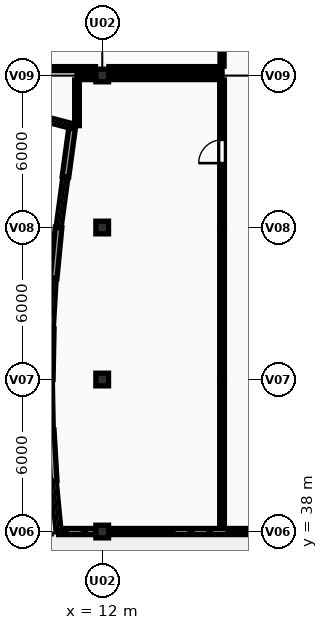
"""IFC4 building model, lengths in metres.
Left out: names, types, materials, properties, quantities, classifications, styles, units other than length and angle.
Written with IfcOpenShell. Run it as: python <this file> out.ifc"""

import sys

from ifc_helpers import new_model, si_unit, direction, frame, frame_2d, origin, origin_2d, place, context, subcontext, project, spatial, rectangle, extrude, element, fill, save


model = new_model("IFC4")
c1 = context("Model", 3, precision=1e-05, world=origin(), true_north=direction((0.0, 1.0)))
c2 = subcontext(c1, "Body", "Model", "MODEL_VIEW")
j1 = project(units=[si_unit("LENGTHUNIT", "METRE"), si_unit("PLANEANGLEUNIT", "RADIAN")], contexts=[c1])
p1 = place(None, origin())
s1 = spatial("IfcSite", under=j1, at=p1, CompositionType="ELEMENT")
p2 = place(p1, origin())
s2 = spatial("IfcBuilding", under=s1, at=p2, CompositionType="ELEMENT")
p3 = place(p2, frame((0.0, 0.0, 4.5)))
s3 = spatial("IfcBuildingStorey", under=s2, at=p3, CompositionType="ELEMENT", Elevation=4.5)
for number, where, z_axis, x_axis in (
    (1, (12.0, 38.0, 0.0), (0.0, 0.0, 1.0), (1.0, 0.0, 0.0)),
    (2, (12.0, 44.0, 0.0), (0.0, 0.0, 1.0), (1.0, 0.0, 0.0)),
    (3, (12.0, 50.0, 0.0), (0.0, 0.0, 1.0), (1.0, 0.0, 0.0)),
    (4, (12.0, 56.0, 0.0), (0.0, 0.0, 1.0), (1.0, 0.0, 0.0)),
):
    element("IfcColumn", number, at=place(p3, frame(where, z_axis=z_axis, x_axis=x_axis)), inside=s3, PredefinedType="COLUMN", context=c2, shape_type="SweptSolid", body=[
        extrude(rectangle(XDim=0.5, YDim=0.5, at=origin_2d()), origin(), (0.0, 0.0, 1.0), 3.9),
    ])
p4 = place(p3, frame((10.278, 38.0, 0.0), z_axis=(0.0, 0.0, 1.0), x_axis=(-0.09623099978, 0.99535902803, 0.0)))
e5 = element("IfcWall", 5, at=p4, inside=s3, PredefinedType="SOLIDWALL", context=c2, shape_type="SweptSolid", body=[
    extrude(rectangle(XDim=2.009, YDim=0.2, at=frame_2d((1.005, 0.0))), origin(), (0.0, 0.0, 1.0), 0.95),
])
p5 = place(p3, frame((10.085, 40.0, 0.0), z_axis=(0.0, 0.0, 1.0), x_axis=(-0.057643251596, 0.998337245396, 0.0)))
e6 = element("IfcWall", 6, at=p5, inside=s3, PredefinedType="SOLIDWALL", context=c2, shape_type="SweptSolid", body=[
    extrude(rectangle(XDim=2.003, YDim=0.26, at=frame_2d((1.002, 0.0))), origin(), (0.0, 0.0, 1.0), 3.65),
])
p6 = place(p3, frame((9.969, 42.0, 0.0), z_axis=(0.0, 0.0, 1.0), x_axis=(-0.019283523045, 0.999814055582, 0.0)))
e7 = element("IfcWall", 7, at=p6, inside=s3, PredefinedType="SOLIDWALL", context=c2, shape_type="SweptSolid", body=[
    extrude(rectangle(XDim=2.0, YDim=0.2, at=frame_2d((1.0, 0.0))), origin(), (0.0, 0.0, 1.0), 0.95),
])
p7 = place(p3, frame((9.931, 44.0, 0.0), z_axis=(0.0, 0.0, 1.0), x_axis=(0.019283523045, 0.999814055582, 0.0)))
e8 = element("IfcWall", 8, at=p7, inside=s3, PredefinedType="SOLIDWALL", context=c2, shape_type="SweptSolid", body=[
    extrude(rectangle(XDim=2.0, YDim=0.26, at=frame_2d((1.0, 0.0))), origin(), (0.0, 0.0, 1.0), 3.65),
])
p8 = place(p3, frame((9.969, 46.0, 0.0), z_axis=(0.0, 0.0, 1.0), x_axis=(0.057643251596, 0.998337245396, 0.0)))
e9 = element("IfcWall", 9, at=p8, inside=s3, PredefinedType="SOLIDWALL", context=c2, shape_type="SweptSolid", body=[
    extrude(rectangle(XDim=2.003, YDim=0.2, at=frame_2d((1.002, 0.0))), origin(), (0.0, 0.0, 1.0), 0.95),
])
p9 = place(p3, frame((10.085, 48.0, 0.0), z_axis=(0.0, 0.0, 1.0), x_axis=(0.09623099978, 0.99535902803, 0.0)))
e10 = element("IfcWall", 10, at=p9, inside=s3, PredefinedType="SOLIDWALL", context=c2, shape_type="SweptSolid", body=[
    extrude(rectangle(XDim=2.009, YDim=0.26, at=frame_2d((1.005, 0.0))), origin(), (0.0, 0.0, 1.0), 3.65),
])
p10 = place(p3, frame((10.278, 50.0, 0.0), z_axis=(0.0, 0.0, 1.0), x_axis=(0.134627389588, 0.990896294257, 0.0)))
e11 = element("IfcWall", 11, at=p10, inside=s3, PredefinedType="SOLIDWALL", context=c2, shape_type="SweptSolid", body=[
    extrude(rectangle(XDim=2.018, YDim=0.2, at=frame_2d((1.009, 0.0))), origin(), (0.0, 0.0, 1.0), 0.95),
])
p11 = place(p3, frame((10.55, 52.0, 0.0), z_axis=(0.0, 0.0, 1.0), x_axis=(0.134627389588, 0.990896294257, 0.0)))
e12 = element("IfcWall", 12, at=p11, inside=s3, PredefinedType="SOLIDWALL", context=c2, shape_type="SweptSolid", body=[
    extrude(rectangle(XDim=2.018, YDim=0.26, at=frame_2d((1.009, 0.0))), origin(), (0.0, 0.0, 1.0), 3.65),
])
p12 = place(p3, frame((10.822, 54.0, 0.0), z_axis=(0.0, 0.0, 1.0), x_axis=(-0.967937555254, 0.251190941573, 0.0)))
e13 = element("IfcWall", 13, at=p12, inside=s3, PredefinedType="SOLIDWALL", context=c2, shape_type="SweptSolid", body=[
    extrude(rectangle(XDim=7.962, YDim=0.2, at=frame_2d((3.981, 0.0))), origin(), (0.0, 0.0, 1.0), 0.95),
])
p13 = place(p3, frame((19.75, 38.0, 0.0), z_axis=(0.0, 0.0, 1.0), x_axis=(-1.0, 0.0, 0.0)))
e14 = element("IfcWall", 14, at=p13, inside=s3, PredefinedType="SOLIDWALL", context=c2, shape_type="SweptSolid", body=[
    extrude(rectangle(XDim=7.5, YDim=0.24, at=frame_2d((3.75, 0.0))), origin(), (0.0, 0.0, 1.0), 2.998),
])
p14 = place(p3, frame((11.75, 38.0, 0.0), z_axis=(0.0, 0.0, 1.0), x_axis=(-1.0, 0.0, 0.0)))
e15 = element("IfcWall", 15, at=p14, inside=s3, PredefinedType="SOLIDWALL", context=c2, shape_type="SweptSolid", body=[
    extrude(rectangle(XDim=1.472, YDim=0.24, at=frame_2d((0.736, 0.0))), origin(), (0.0, 0.0, 1.0), 3.0),
])
p15 = place(p3, frame((3.319, 56.27, 0.0), z_axis=(0.0, 0.0, 1.0), x_axis=(1.0, 0.0, 0.0)))
e16 = element("IfcWall", 16, at=p15, inside=s3, PredefinedType="PARTITIONING", context=c2, shape_type="SweptSolid", body=[
    extrude(rectangle(XDim=8.416, YDim=0.16, at=frame_2d((4.208, 0.0))), origin(), (0.0, 0.0, 1.0), 3.0),
])
p16 = place(p3, frame((12.265, 56.27, 0.0), z_axis=(0.0, 0.0, 1.0), x_axis=(1.0, 0.0, 0.0)))
e17 = element("IfcWall", 17, at=p16, inside=s3, PredefinedType="PARTITIONING", context=c2, shape_type="SweptSolid", body=[
    extrude(rectangle(XDim=4.465, YDim=0.16, at=frame_2d((2.232, 0.0))), origin(), (0.0, 0.0, 1.0), 3.0),
])
p17 = place(p3, frame((16.73, 56.365, 0.0), z_axis=(0.0, 0.0, 1.0), x_axis=(0.0, 1.0, 0.0)))
e18 = element("IfcWall", 18, at=p17, inside=s3, PredefinedType="PARTITIONING", context=c2, shape_type="SweptSolid", body=[
    extrude(rectangle(XDim=7.635, YDim=0.16, at=frame_2d((3.817, 0.0))), origin(), (0.0, 0.0, 1.0), 3.65),
])
p18 = place(p17, frame((6.235, 0.0, 0.0)))
e19 = element("IfcOpeningElement", 19, at=p18, cuts=e18, PredefinedType="OPENING", context=c2, shape_type="SweptSolid", body=[
    extrude(rectangle(XDim=1.0, YDim=2.15, at=frame_2d((0.5, 1.075))), frame((0.0, 0.09, 0.0), z_axis=(0.0, -1.0, 0.0), x_axis=(1.0, 0.0, 0.0)), (0.0, 0.0, 1.0), 0.18),
])
p19 = place(p3, frame((11.005, 55.93, 0.0), z_axis=(0.0, 0.0, 1.0), x_axis=(1.0, 0.0, 0.0)))
e20 = element("IfcWall", 20, at=p19, inside=s3, PredefinedType="PARTITIONING", context=c2, shape_type="SweptSolid", body=[
    extrude(rectangle(XDim=5.725, YDim=0.185, at=frame_2d((2.863, 0.0))), origin(), (0.0, 0.0, 1.0), 3.0),
])
p20 = place(p3, frame((11.005, 54.02, 0.0), z_axis=(0.0, 0.0, 1.0), x_axis=(0.0, 1.0, 0.0)))
e21 = element("IfcWall", 21, at=p20, inside=s3, PredefinedType="PARTITIONING", context=c2, shape_type="SweptSolid", body=[
    extrude(rectangle(XDim=1.802, YDim=0.185, at=frame_2d((0.901, 0.0))), origin(), (0.0, 0.0, 1.0), 3.65),
])
p21 = place(p3, frame((16.73, 38.162, 0.0), z_axis=(0.0, 0.0, 1.0), x_axis=(0.0, 1.0, 0.0)))
e22 = element("IfcWall", 22, at=p21, inside=s3, PredefinedType="PARTITIONING", context=c2, shape_type="SweptSolid", body=[
    extrude(rectangle(XDim=5.838, YDim=0.185, at=frame_2d((2.919, 0.0))), origin(), (0.0, 0.0, 1.0), 3.65),
])
p22 = place(p3, frame((16.73, 44.0, 0.0), z_axis=(0.0, 0.0, 1.0), x_axis=(0.0, 1.0, 0.0)))
e23 = element("IfcWall", 23, at=p22, inside=s3, PredefinedType="PARTITIONING", context=c2, shape_type="SweptSolid", body=[
    extrude(rectangle(XDim=6.0, YDim=0.185, at=frame_2d((3.0, 0.0))), origin(), (0.0, 0.0, 1.0), 3.65),
])
p23 = place(p3, frame((16.73, 50.0, 0.0), z_axis=(0.0, 0.0, 1.0), x_axis=(0.0, 1.0, 0.0)))
e24 = element("IfcWall", 24, at=p23, inside=s3, PredefinedType="PARTITIONING", context=c2, shape_type="SweptSolid", body=[
    extrude(rectangle(XDim=5.823, YDim=0.185, at=frame_2d((2.911, 0.0))), origin(), (0.0, 0.0, 1.0), 3.65),
])
p24 = place(p23, frame((2.54, 0.0, 0.0)))
e25 = element("IfcOpeningElement", 25, at=p24, cuts=e24, PredefinedType="OPENING", context=c2, shape_type="SweptSolid", body=[
    extrude(rectangle(XDim=0.92, YDim=2.2, at=frame_2d((0.46, 1.1))), frame((0.0, 0.103, 0.0), z_axis=(0.0, -1.0, 0.0), x_axis=(1.0, 0.0, 0.0)), (0.0, 0.0, 1.0), 0.205),
])
p25 = place(p24, origin())
e26 = element("IfcDoor", 26, at=p25, inside=s3, OperationType="SINGLE_SWING_LEFT", PredefinedType="DOOR", context=c2, shape_type="SweptSolid", body=[
    extrude(rectangle(XDim=0.92, YDim=2.2, at=frame_2d((0.46, 1.1))), frame((0.0, 0.025, 0.0), z_axis=(0.0, -1.0, 0.0), x_axis=(1.0, 0.0, 0.0)), (0.0, 0.0, 1.0), 0.05),
])
fill(e25, e26)
save(model, sys.argv[1])
